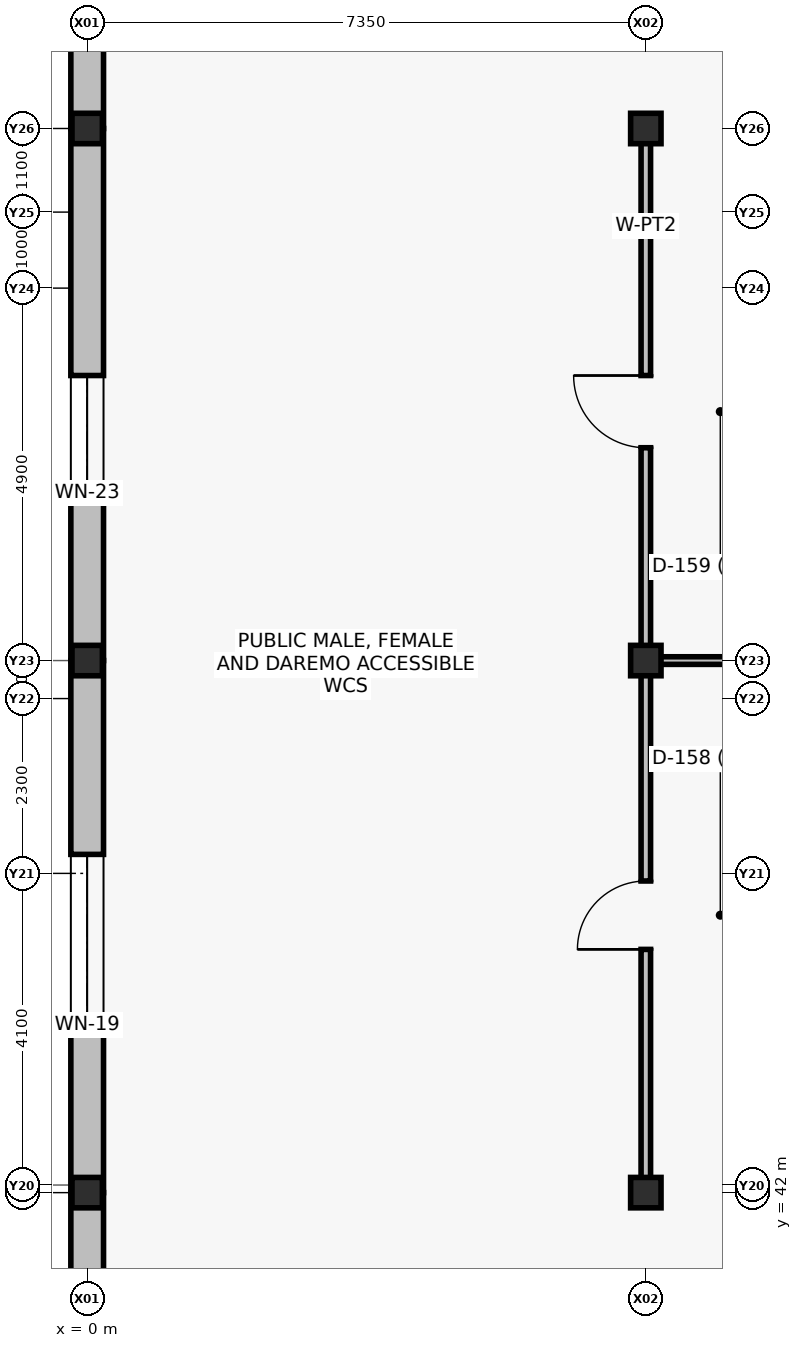
"""IFC4 building model, lengths in metres.
Left out: names, types, materials, properties, quantities, classifications, styles, units other than length and angle.
Written with IfcOpenShell. Run it as: python <this file> out.ifc"""

import sys

from ifc_helpers import new_model, si_unit, direction, frame, frame_2d, origin, origin_2d, place, context, subcontext, project, spatial, rectangle, i_section, extrude, element, fill, save


model = new_model("IFC4")
c1 = context("Model", 3, precision=1e-05, world=origin(), true_north=direction((0.0, 1.0)))
c2 = subcontext(c1, "Body", "Model", "MODEL_VIEW")
j1 = project(units=[si_unit("LENGTHUNIT", "METRE"), si_unit("PLANEANGLEUNIT", "RADIAN")], contexts=[c1])
p1 = place(None, origin())
s1 = spatial("IfcSite", under=j1, at=p1, CompositionType="ELEMENT")
p2 = place(p1, origin())
s2 = spatial("IfcBuilding", under=s1, at=p2, CompositionType="ELEMENT")
p3 = place(p2, origin())
s3 = spatial("IfcBuildingStorey", under=s2, at=p3, CompositionType="ELEMENT", Elevation=0.0)
for number, where, z_axis, x_axis in (
    (1, (0.0, 42.0, -0.35), (0.0, 0.0, 1.0), (1.0, 0.0, 0.0)),
    (2, (0.0, 49.0, -0.35), (0.0, 0.0, 1.0), (1.0, 0.0, 0.0)),
    (3, (0.0, 56.0, -0.35), (0.0, 0.0, 1.0), (1.0, 0.0, 0.0)),
    (4, (7.35, 42.0, -0.35), (0.0, 0.0, 1.0), (1.0, 0.0, 0.0)),
    (5, (7.35, 49.0, -0.35), (0.0, 0.0, 1.0), (1.0, 0.0, 0.0)),
    (6, (7.35, 56.0, -0.35), (0.0, 0.0, 1.0), (1.0, 0.0, 0.0)),
):
    element("IfcColumn", number, at=place(p3, frame(where, z_axis=z_axis, x_axis=x_axis)), inside=s3, PredefinedType="COLUMN", context=c2, shape_type="SweptSolid", body=[
        extrude(i_section(OverallWidth=0.4, OverallDepth=0.4, WebThickness=0.013, FlangeThickness=0.021, at=origin_2d()), origin(), (0.0, 0.0, 1.0), 6.35),
    ])
p4 = place(p3, frame((0.0, 35.0, 0.0), z_axis=(0.0, 0.0, 1.0), x_axis=(0.0, 1.0, 0.0)))
e7 = element("IfcWall", 7, at=p4, inside=s3, PredefinedType="SOLIDWALL", context=c2, shape_type="SweptSolid", body=[
    extrude(rectangle(XDim=7.0, YDim=0.43, at=frame_2d((3.5, 0.0))), origin(), (0.0, 0.0, 1.0), 5.15),
])
p5 = place(p4, frame((2.2, 0.0, 1.0)))
e8 = element("IfcOpeningElement", 8, at=p5, cuts=e7, PredefinedType="OPENING", context=c2, shape_type="SweptSolid", body=[
    extrude(rectangle(XDim=3.0, YDim=2.2, at=frame_2d((1.5, 1.1))), frame((0.0, 0.225, 0.0), z_axis=(0.0, -1.0, 0.0), x_axis=(1.0, 0.0, 0.0)), (0.0, 0.0, 1.0), 0.45),
])
p6 = place(p3, frame((0.0, 42.0, 0.0), z_axis=(0.0, 0.0, 1.0), x_axis=(0.0, 1.0, 0.0)))
e9 = element("IfcWall", 9, at=p6, inside=s3, PredefinedType="SOLIDWALL", context=c2, shape_type="SweptSolid", body=[
    extrude(rectangle(XDim=7.0, YDim=0.43, at=frame_2d((3.5, 0.0))), origin(), (0.0, 0.0, 1.0), 5.15),
])
p7 = place(p6, frame((2.2, 0.0, 1.0)))
e10 = element("IfcOpeningElement", 10, at=p7, cuts=e9, PredefinedType="OPENING", context=c2, shape_type="SweptSolid", body=[
    extrude(rectangle(XDim=2.25, YDim=1.95, at=frame_2d((1.125, 0.975))), frame((0.0, 0.225, 0.0), z_axis=(0.0, -1.0, 0.0), x_axis=(1.0, 0.0, 0.0)), (0.0, 0.0, 1.0), 0.45),
])
p8 = place(p3, frame((0.0, 49.0, 0.0), z_axis=(0.0, 0.0, 1.0), x_axis=(0.0, 1.0, 0.0)))
e11 = element("IfcWall", 11, at=p8, inside=s3, PredefinedType="SOLIDWALL", context=c2, shape_type="SweptSolid", body=[
    extrude(rectangle(XDim=7.0, YDim=0.43, at=frame_2d((3.5, 0.0))), origin(), (0.0, 0.0, 1.0), 5.15),
])
p9 = place(p8, frame((2.2, 0.0, 1.0)))
e12 = element("IfcOpeningElement", 12, at=p9, cuts=e11, PredefinedType="OPENING", context=c2, shape_type="SweptSolid", body=[
    extrude(rectangle(XDim=1.55, YDim=1.85, at=frame_2d((0.775, 0.925))), frame((0.0, 0.225, 0.0), z_axis=(0.0, -1.0, 0.0), x_axis=(1.0, 0.0, 0.0)), (0.0, 0.0, 1.0), 0.45),
])
p10 = place(p3, frame((0.0, 56.0, 0.0), z_axis=(0.0, 0.0, 1.0), x_axis=(0.0, 1.0, 0.0)))
e13 = element("IfcWall", 13, at=p10, inside=s3, PredefinedType="SOLIDWALL", context=c2, shape_type="SweptSolid", body=[
    extrude(rectangle(XDim=7.0, YDim=0.43, at=frame_2d((3.5, 0.0))), origin(), (0.0, 0.0, 1.0), 5.15),
])
p11 = place(p3, frame((7.35, 42.0, 0.0), z_axis=(0.0, 0.0, 1.0), x_axis=(0.0, 1.0, 0.0)))
e14 = element("IfcWall", 14, at=p11, inside=s3, PredefinedType="PARTITIONING", context=c2, shape_type="SweptSolid", body=[
    extrude(rectangle(XDim=14.0, YDim=0.125, at=frame_2d((7.0, 0.0))), origin(), (0.0, 0.0, 1.0), 4.35),
])
p12 = place(p11, frame((3.2, 0.0, 0.0)))
e15 = element("IfcOpeningElement", 15, at=p12, cuts=e14, PredefinedType="OPENING", context=c2, shape_type="SweptSolid", body=[
    extrude(rectangle(XDim=0.9, YDim=2.1, at=frame_2d((0.45, 1.05))), frame((0.0, 0.072, 0.0), z_axis=(0.0, -1.0, 0.0), x_axis=(1.0, 0.0, 0.0)), (0.0, 0.0, 1.0), 0.145),
])
p13 = place(p11, frame((9.8, 0.0, 0.0)))
e16 = element("IfcOpeningElement", 16, at=p13, cuts=e14, PredefinedType="OPENING", context=c2, shape_type="SweptSolid", body=[
    extrude(rectangle(XDim=0.95, YDim=2.2, at=frame_2d((0.475, 1.1))), frame((0.0, 0.072, 0.0), z_axis=(0.0, -1.0, 0.0), x_axis=(1.0, 0.0, 0.0)), (0.0, 0.0, 1.0), 0.145),
])
p14 = place(p3, frame((7.35, 49.0, 0.0), z_axis=(0.0, 0.0, 1.0), x_axis=(1.0, 0.0, 0.0)))
e17 = element("IfcWall", 17, at=p14, inside=s3, PredefinedType="PARTITIONING", context=c2, shape_type="SweptSolid", body=[
    extrude(rectangle(XDim=22.05, YDim=0.1, at=frame_2d((11.025, 0.0))), origin(), (0.0, 0.0, 1.0), 4.35),
])
p15 = place(p14, frame((4.0, 0.0, 0.0)))
e18 = element("IfcOpeningElement", 18, at=p15, cuts=e17, PredefinedType="OPENING", context=c2, shape_type="SweptSolid", body=[
    extrude(rectangle(XDim=1.15, YDim=2.15, at=frame_2d((0.575, 1.075))), frame((0.0, 0.06, 0.0), z_axis=(0.0, -1.0, 0.0), x_axis=(1.0, 0.0, 0.0)), (0.0, 0.0, 1.0), 0.12),
])
p16 = place(p7, origin())
e19 = element("IfcWindow", 19, at=p16, inside=s3, PartitioningType="SINGLE_PANEL", PredefinedType="WINDOW", context=c2, shape_type="SweptSolid", body=[
    extrude(rectangle(XDim=2.25, YDim=1.95, at=frame_2d((1.125, 0.975))), frame((0.0, 0.03, 0.0), z_axis=(0.0, -1.0, 0.0), x_axis=(1.0, 0.0, 0.0)), (0.0, 0.0, 1.0), 0.06),
])
fill(e10, e19)
p17 = place(p9, origin())
e20 = element("IfcWindow", 20, at=p17, inside=s3, PartitioningType="SINGLE_PANEL", PredefinedType="WINDOW", context=c2, shape_type="SweptSolid", body=[
    extrude(rectangle(XDim=1.55, YDim=1.85, at=frame_2d((0.775, 0.925))), frame((0.0, 0.03, 0.0), z_axis=(0.0, -1.0, 0.0), x_axis=(1.0, 0.0, 0.0)), (0.0, 0.0, 1.0), 0.06),
])
fill(e12, e20)
p18 = place(p12, origin())
e21 = element("IfcDoor", 21, at=p18, inside=s3, OperationType="SINGLE_SWING_LEFT", PredefinedType="DOOR", context=c2, shape_type="SweptSolid", body=[
    extrude(rectangle(XDim=0.9, YDim=2.1, at=frame_2d((0.45, 1.05))), frame((0.0, 0.025, 0.0), z_axis=(0.0, -1.0, 0.0), x_axis=(1.0, 0.0, 0.0)), (0.0, 0.0, 1.0), 0.05),
])
fill(e15, e21)
p19 = place(p13, origin())
e22 = element("IfcDoor", 22, at=p19, inside=s3, OperationType="SINGLE_SWING_RIGHT", PredefinedType="DOOR", context=c2, shape_type="SweptSolid", body=[
    extrude(rectangle(XDim=0.95, YDim=2.2, at=frame_2d((0.475, 1.1))), frame((0.0, 0.025, 0.0), z_axis=(0.0, -1.0, 0.0), x_axis=(1.0, 0.0, 0.0)), (0.0, 0.0, 1.0), 0.05),
])
fill(e16, e22)
save(model, sys.argv[1])
